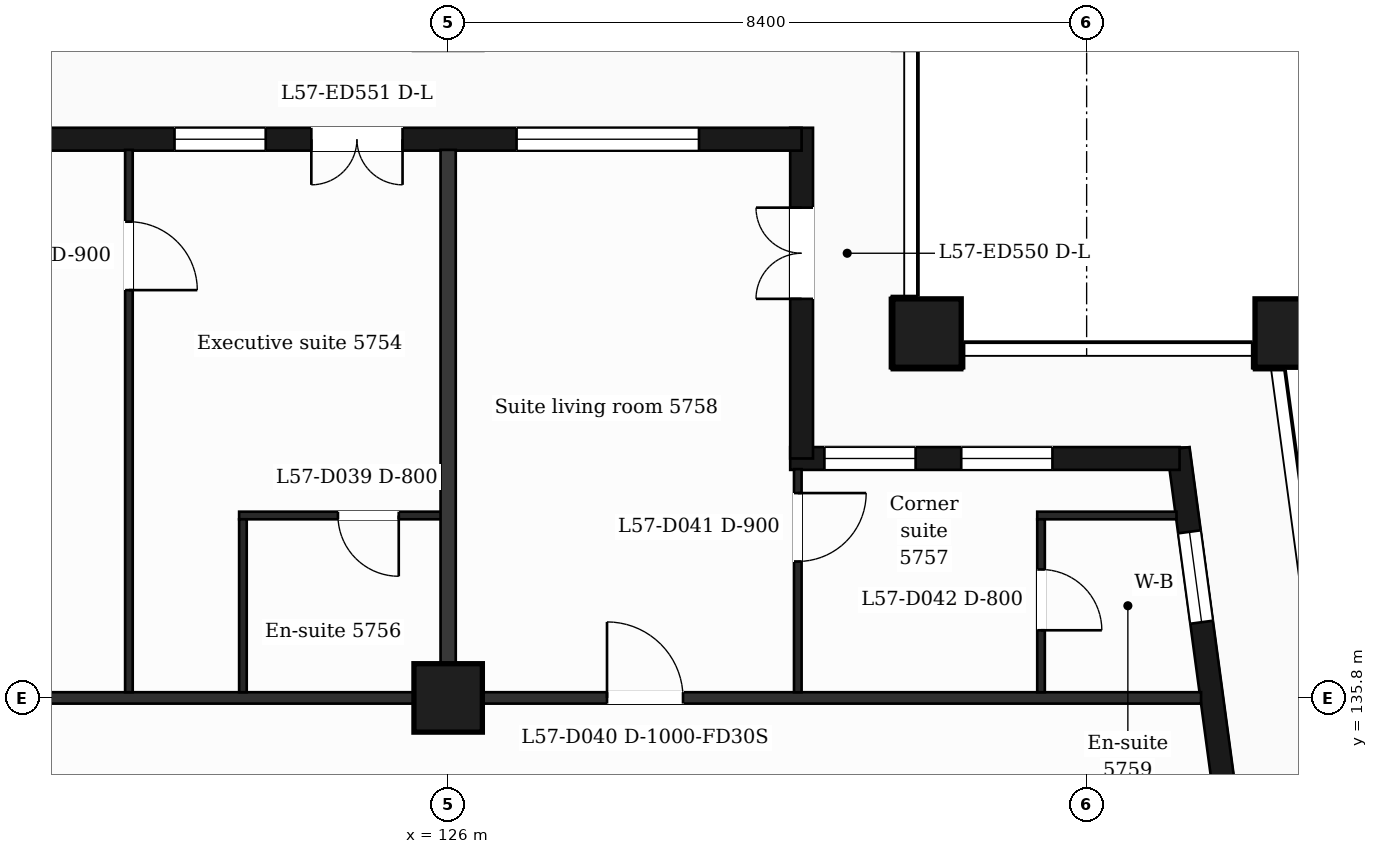
"""IFC4 building model, lengths in metres.
Left out: names, types, materials, properties, quantities, classifications, styles, units other than length and angle.
Written with IfcOpenShell. Run it as: python <this file> out.ifc"""

import sys

from ifc_helpers import new_model, si_unit, direction, frame, frame_2d, origin, origin_2d, place, context, subcontext, project, spatial, rectangle, extrude, element, fill, save


model = new_model("IFC4")
c1 = context("Model", 3, precision=1e-05, world=origin(), true_north=direction((0.0, 1.0)))
c2 = subcontext(c1, "Body", "Model", "MODEL_VIEW")
j1 = project(units=[si_unit("LENGTHUNIT", "METRE"), si_unit("PLANEANGLEUNIT", "RADIAN")], contexts=[c1])
p1 = place(None, origin())
s1 = spatial("IfcSite", under=j1, at=p1, CompositionType="ELEMENT")
p2 = place(p1, origin())
s2 = spatial("IfcBuilding", under=s1, at=p2, CompositionType="ELEMENT")
p3 = place(p2, frame((0.0, 0.0, 235.5)))
s3 = spatial("IfcBuildingStorey", under=s2, at=p3, CompositionType="ELEMENT", Elevation=235.5)
for number, where, z_axis, x_axis in (
    (1, (132.3, 140.6, 0.0), (0.0, 0.0, 1.0), (1.0, 0.0, 0.0)),
    (2, (137.065, 140.6, 0.0), (0.0, 0.0, 1.0), (1.0, 0.0, 0.0)),
    (3, (126.0, 135.8, 0.0), (0.0, 0.0, 1.0), (1.0, 0.0, 0.0)),
):
    element("IfcColumn", number, at=place(p3, frame(where, z_axis=z_axis, x_axis=x_axis)), inside=s3, PredefinedType="COLUMN", context=c2, shape_type="SweptSolid", body=[
        extrude(rectangle(XDim=0.9, YDim=0.9, at=origin_2d()), origin(), (0.0, 0.0, 1.0), 3.7),
    ])
p4 = place(p3, frame((136.504, 132.4, 0.0), z_axis=(0.0, 0.0, 1.0), x_axis=(-0.133399697462, 0.99106231929, 0.0)))
e4 = element("IfcWall", 4, at=p4, inside=s3, PredefinedType="SOLIDWALL", context=c2, shape_type="SweptSolid", body=[
    extrude(rectangle(XDim=6.74, YDim=0.3, at=frame_2d((3.37, 0.0))), origin(), (0.0, 0.0, 1.0), 3.38),
])
p5 = place(p4, frame((1.115, 0.0, 0.0)))
e5 = element("IfcOpeningElement", 5, at=p5, cuts=e4, PredefinedType="OPENING", context=c2, shape_type="SweptSolid", body=[
    extrude(rectangle(XDim=1.2, YDim=2.4, at=frame_2d((0.6, 1.2))), frame((0.0, 0.16, 0.0), z_axis=(0.0, -1.0, 0.0), x_axis=(1.0, 0.0, 0.0)), (0.0, 0.0, 1.0), 0.32),
])
p6 = place(p4, frame((4.436, 0.0, 0.9)))
e6 = element("IfcOpeningElement", 6, at=p6, cuts=e4, PredefinedType="OPENING", context=c2, shape_type="SweptSolid", body=[
    extrude(rectangle(XDim=1.2, YDim=2.1, at=frame_2d((0.6, 1.05))), frame((0.0, 0.16, 0.0), z_axis=(0.0, -1.0, 0.0), x_axis=(1.0, 0.0, 0.0)), (0.0, 0.0, 1.0), 0.32),
])
p7 = place(p3, frame((135.623, 138.95, 0.0), z_axis=(0.0, 0.0, 1.0), x_axis=(-1.0, 0.0, 0.0)))
e7 = element("IfcWall", 7, at=p7, inside=s3, PredefinedType="SOLIDWALL", context=c2, shape_type="SweptSolid", body=[
    extrude(rectangle(XDim=5.123, YDim=0.3, at=frame_2d((2.561, 0.0))), origin(), (0.0, 0.0, 1.0), 3.38),
])
p8 = place(p7, frame((1.673, 0.0, 0.9)))
e8 = element("IfcOpeningElement", 8, at=p8, cuts=e7, PredefinedType="OPENING", context=c2, shape_type="SweptSolid", body=[
    extrude(rectangle(XDim=1.2, YDim=2.1, at=frame_2d((0.6, 1.05))), frame((0.0, 0.16, 0.0), z_axis=(0.0, -1.0, 0.0), x_axis=(1.0, 0.0, 0.0)), (0.0, 0.0, 1.0), 0.32),
])
p9 = place(p7, frame((3.473, 0.0, 0.9)))
e9 = element("IfcOpeningElement", 9, at=p9, cuts=e7, PredefinedType="OPENING", context=c2, shape_type="SweptSolid", body=[
    extrude(rectangle(XDim=1.2, YDim=2.1, at=frame_2d((0.6, 1.05))), frame((0.0, 0.16, 0.0), z_axis=(0.0, -1.0, 0.0), x_axis=(1.0, 0.0, 0.0)), (0.0, 0.0, 1.0), 0.32),
])
p10 = place(p3, frame((130.65, 138.95, 0.0), z_axis=(0.0, 0.0, 1.0), x_axis=(0.0, 1.0, 0.0)))
e10 = element("IfcWall", 10, at=p10, inside=s3, PredefinedType="SOLIDWALL", context=c2, shape_type="SweptSolid", body=[
    extrude(rectangle(XDim=4.35, YDim=0.3, at=frame_2d((2.175, 0.0))), origin(), (0.0, 0.0, 1.0), 3.38),
])
p11 = place(p10, frame((2.1, 0.0, 0.0)))
e11 = element("IfcOpeningElement", 11, at=p11, cuts=e10, PredefinedType="OPENING", context=c2, shape_type="SweptSolid", body=[
    extrude(rectangle(XDim=1.2, YDim=2.4, at=frame_2d((0.6, 1.2))), frame((0.0, 0.16, 0.0), z_axis=(0.0, -1.0, 0.0), x_axis=(1.0, 0.0, 0.0)), (0.0, 0.0, 1.0), 0.32),
])
p12 = place(p3, frame((130.65, 143.15, 0.0), z_axis=(0.0, 0.0, 1.0), x_axis=(-1.0, 0.0, 0.0)))
e12 = element("IfcWall", 12, at=p12, inside=s3, PredefinedType="SOLIDWALL", context=c2, shape_type="SweptSolid", body=[
    extrude(rectangle(XDim=14.25, YDim=0.3, at=frame_2d((7.125, 0.0))), origin(), (0.0, 0.0, 1.0), 3.38),
])
p13 = place(p12, frame((1.35, 0.0, 0.9)))
e13 = element("IfcOpeningElement", 13, at=p13, cuts=e12, PredefinedType="OPENING", context=c2, shape_type="SweptSolid", body=[
    extrude(rectangle(XDim=2.4, YDim=2.1, at=frame_2d((1.2, 1.05))), frame((0.0, 0.16, 0.0), z_axis=(0.0, -1.0, 0.0), x_axis=(1.0, 0.0, 0.0)), (0.0, 0.0, 1.0), 0.32),
])
p14 = place(p12, frame((5.25, 0.0, 0.0)))
e14 = element("IfcOpeningElement", 14, at=p14, cuts=e12, PredefinedType="OPENING", context=c2, shape_type="SweptSolid", body=[
    extrude(rectangle(XDim=1.2, YDim=2.4, at=frame_2d((0.6, 1.2))), frame((0.0, 0.16, 0.0), z_axis=(0.0, -1.0, 0.0), x_axis=(1.0, 0.0, 0.0)), (0.0, 0.0, 1.0), 0.32),
])
p15 = place(p12, frame((7.05, 0.0, 0.9)))
e15 = element("IfcOpeningElement", 15, at=p15, cuts=e12, PredefinedType="OPENING", context=c2, shape_type="SweptSolid", body=[
    extrude(rectangle(XDim=1.2, YDim=2.1, at=frame_2d((0.6, 1.05))), frame((0.0, 0.16, 0.0), z_axis=(0.0, -1.0, 0.0), x_axis=(1.0, 0.0, 0.0)), (0.0, 0.0, 1.0), 0.32),
])
p16 = place(p12, frame((10.35, 0.0, 0.9)))
e16 = element("IfcOpeningElement", 16, at=p16, cuts=e12, PredefinedType="OPENING", context=c2, shape_type="SweptSolid", body=[
    extrude(rectangle(XDim=1.2, YDim=2.1, at=frame_2d((0.6, 1.05))), frame((0.0, 0.16, 0.0), z_axis=(0.0, -1.0, 0.0), x_axis=(1.0, 0.0, 0.0)), (0.0, 0.0, 1.0), 0.32),
])
p17 = place(p3, frame((90.895, 135.8, 0.0), z_axis=(0.0, 0.0, 1.0), x_axis=(1.0, 0.0, 0.0)))
e17 = element("IfcWall", 17, at=p17, inside=s3, PredefinedType="PARTITIONING", context=c2, shape_type="SweptSolid", body=[
    extrude(rectangle(XDim=45.011, YDim=0.15, at=frame_2d((22.505, 0.0))), origin(), (0.0, 0.0, 1.0), 3.38),
])
p18 = place(p17, frame((7.675, 0.0, 0.0)))
e18 = element("IfcOpeningElement", 18, at=p18, cuts=e17, PredefinedType="OPENING", context=c2, shape_type="SweptSolid", body=[
    extrude(rectangle(XDim=1.0, YDim=2.1, at=frame_2d((0.5, 1.05))), frame((0.0, 0.085, 0.0), z_axis=(0.0, -1.0, 0.0), x_axis=(1.0, 0.0, 0.0)), (0.0, 0.0, 1.0), 0.17),
])
p19 = place(p17, frame((12.58, 0.0, 0.0)))
e19 = element("IfcOpeningElement", 19, at=p19, cuts=e17, PredefinedType="OPENING", context=c2, shape_type="SweptSolid", body=[
    extrude(rectangle(XDim=0.95, YDim=2.1, at=frame_2d((0.475, 1.05))), frame((0.0, 0.085, 0.0), z_axis=(0.0, -1.0, 0.0), x_axis=(1.0, 0.0, 0.0)), (0.0, 0.0, 1.0), 0.17),
])
p20 = place(p17, frame((20.568, 0.0, 0.0)))
e20 = element("IfcOpeningElement", 20, at=p20, cuts=e17, PredefinedType="OPENING", context=c2, shape_type="SweptSolid", body=[
    extrude(rectangle(XDim=0.95, YDim=2.1, at=frame_2d((0.475, 1.05))), frame((0.0, 0.085, 0.0), z_axis=(0.0, -1.0, 0.0), x_axis=(1.0, 0.0, 0.0)), (0.0, 0.0, 1.0), 0.17),
])
p21 = place(p17, frame((24.865, 0.0, 0.0)))
e21 = element("IfcOpeningElement", 21, at=p21, cuts=e17, PredefinedType="OPENING", context=c2, shape_type="SweptSolid", body=[
    extrude(rectangle(XDim=1.0, YDim=2.1, at=frame_2d((0.5, 1.05))), frame((0.0, 0.085, 0.0), z_axis=(0.0, -1.0, 0.0), x_axis=(1.0, 0.0, 0.0)), (0.0, 0.0, 1.0), 0.17),
])
p22 = place(p17, frame((37.195, 0.0, 0.0)))
e22 = element("IfcOpeningElement", 22, at=p22, cuts=e17, PredefinedType="OPENING", context=c2, shape_type="SweptSolid", body=[
    extrude(rectangle(XDim=1.0, YDim=2.1, at=frame_2d((0.5, 1.05))), frame((0.0, 0.085, 0.0), z_axis=(0.0, -1.0, 0.0), x_axis=(1.0, 0.0, 0.0)), (0.0, 0.0, 1.0), 0.17),
])
p23 = place(p3, frame((123.25, 138.2, 0.0), z_axis=(0.0, 0.0, 1.0), x_axis=(1.0, 0.0, 0.0)))
e23 = element("IfcWall", 23, at=p23, inside=s3, PredefinedType="PARTITIONING", context=c2, shape_type="SweptSolid", body=[
    extrude(rectangle(XDim=2.75, YDim=0.1, at=frame_2d((1.375, 0.0))), origin(), (0.0, 0.0, 1.0), 3.38),
])
p24 = place(p23, frame((1.3, 0.0, 0.0)))
e24 = element("IfcOpeningElement", 24, at=p24, cuts=e23, PredefinedType="OPENING", context=c2, shape_type="SweptSolid", body=[
    extrude(rectangle(XDim=0.8, YDim=2.1, at=frame_2d((0.4, 1.05))), frame((0.0, 0.06, 0.0), z_axis=(0.0, -1.0, 0.0), x_axis=(1.0, 0.0, 0.0)), (0.0, 0.0, 1.0), 0.12),
])
p25 = place(p3, frame((133.75, 138.2, 0.0), z_axis=(0.0, 0.0, 1.0), x_axis=(1.0, 0.0, 0.0)))
e25 = element("IfcWall", 25, at=p25, inside=s3, PredefinedType="PARTITIONING", context=c2, shape_type="SweptSolid", body=[
    extrude(rectangle(XDim=1.832, YDim=0.1, at=frame_2d((0.916, 0.0))), origin(), (0.0, 0.0, 1.0), 3.38),
])
p26 = place(p3, frame((121.8, 135.875, 0.0), z_axis=(0.0, 0.0, 1.0), x_axis=(0.0, 1.0, 0.0)))
e26 = element("IfcWall", 26, at=p26, inside=s3, PredefinedType="PARTITIONING", context=c2, shape_type="SweptSolid", body=[
    extrude(rectangle(XDim=7.135, YDim=0.1, at=frame_2d((3.567, 0.0))), origin(), (0.0, 0.0, 1.0), 3.38),
])
p27 = place(p26, frame((5.29, 0.0, 0.0)))
e27 = element("IfcOpeningElement", 27, at=p27, cuts=e26, PredefinedType="OPENING", context=c2, shape_type="SweptSolid", body=[
    extrude(rectangle(XDim=0.9, YDim=2.1, at=frame_2d((0.45, 1.05))), frame((0.0, 0.06, 0.0), z_axis=(0.0, -1.0, 0.0), x_axis=(1.0, 0.0, 0.0)), (0.0, 0.0, 1.0), 0.12),
])
p28 = place(p3, frame((123.3, 135.875, 0.0), z_axis=(0.0, 0.0, 1.0), x_axis=(0.0, 1.0, 0.0)))
e28 = element("IfcWall", 28, at=p28, inside=s3, PredefinedType="PARTITIONING", context=c2, shape_type="SweptSolid", body=[
    extrude(rectangle(XDim=2.275, YDim=0.1, at=frame_2d((1.137, 0.0))), origin(), (0.0, 0.0, 1.0), 3.38),
])
p29 = place(p3, frame((126.0, 135.875, 0.0), z_axis=(0.0, 0.0, 1.0), x_axis=(0.0, 1.0, 0.0)))
e29 = element("IfcWall", 29, at=p29, inside=s3, PredefinedType="PARTITIONING", context=c2, shape_type="SweptSolid", body=[
    extrude(rectangle(XDim=7.135, YDim=0.2, at=frame_2d((3.567, 0.0))), origin(), (0.0, 0.0, 1.0), 3.38),
])
p30 = place(p3, frame((130.6, 135.875, 0.0), z_axis=(0.0, 0.0, 1.0), x_axis=(0.0, 1.0, 0.0)))
e30 = element("IfcWall", 30, at=p30, inside=s3, PredefinedType="PARTITIONING", context=c2, shape_type="SweptSolid", body=[
    extrude(rectangle(XDim=2.935, YDim=0.1, at=frame_2d((1.468, 0.0))), origin(), (0.0, 0.0, 1.0), 3.38),
])
p31 = place(p30, frame((1.72, 0.0, 0.0)))
e31 = element("IfcOpeningElement", 31, at=p31, cuts=e30, PredefinedType="OPENING", context=c2, shape_type="SweptSolid", body=[
    extrude(rectangle(XDim=0.9, YDim=2.1, at=frame_2d((0.45, 1.05))), frame((0.0, 0.06, 0.0), z_axis=(0.0, -1.0, 0.0), x_axis=(1.0, 0.0, 0.0)), (0.0, 0.0, 1.0), 0.12),
])
p32 = place(p3, frame((133.8, 135.875, 0.0), z_axis=(0.0, 0.0, 1.0), x_axis=(0.0, 1.0, 0.0)))
e32 = element("IfcWall", 32, at=p32, inside=s3, PredefinedType="PARTITIONING", context=c2, shape_type="SweptSolid", body=[
    extrude(rectangle(XDim=2.275, YDim=0.1, at=frame_2d((1.137, 0.0))), origin(), (0.0, 0.0, 1.0), 3.38),
])
p33 = place(p32, frame((0.815, 0.0, 0.0)))
e33 = element("IfcOpeningElement", 33, at=p33, cuts=e32, PredefinedType="OPENING", context=c2, shape_type="SweptSolid", body=[
    extrude(rectangle(XDim=0.8, YDim=2.1, at=frame_2d((0.4, 1.05))), frame((0.0, 0.06, 0.0), z_axis=(0.0, -1.0, 0.0), x_axis=(1.0, 0.0, 0.0)), (0.0, 0.0, 1.0), 0.12),
])
p34 = place(p6, origin())
e34 = element("IfcWindow", 34, at=p34, inside=s3, PartitioningType="SINGLE_PANEL", PredefinedType="WINDOW", context=c2, shape_type="SweptSolid", body=[
    extrude(rectangle(XDim=1.2, YDim=2.1, at=frame_2d((0.6, 1.05))), frame((0.0, 0.03, 0.0), z_axis=(0.0, -1.0, 0.0), x_axis=(1.0, 0.0, 0.0)), (0.0, 0.0, 1.0), 0.06),
])
fill(e6, e34)
p35 = place(p8, origin())
e35 = element("IfcWindow", 35, at=p35, inside=s3, PartitioningType="SINGLE_PANEL", PredefinedType="WINDOW", context=c2, shape_type="SweptSolid", body=[
    extrude(rectangle(XDim=1.2, YDim=2.1, at=frame_2d((0.6, 1.05))), frame((0.0, 0.03, 0.0), z_axis=(0.0, -1.0, 0.0), x_axis=(1.0, 0.0, 0.0)), (0.0, 0.0, 1.0), 0.06),
])
fill(e8, e35)
p36 = place(p9, origin())
e36 = element("IfcWindow", 36, at=p36, inside=s3, PartitioningType="SINGLE_PANEL", PredefinedType="WINDOW", context=c2, shape_type="SweptSolid", body=[
    extrude(rectangle(XDim=1.2, YDim=2.1, at=frame_2d((0.6, 1.05))), frame((0.0, 0.03, 0.0), z_axis=(0.0, -1.0, 0.0), x_axis=(1.0, 0.0, 0.0)), (0.0, 0.0, 1.0), 0.06),
])
fill(e9, e36)
p37 = place(p11, origin())
e37 = element("IfcDoor", 37, at=p37, inside=s3, OperationType="DOUBLE_DOOR_SINGLE_SWING", PredefinedType="DOOR", context=c2, shape_type="SweptSolid", body=[
    extrude(rectangle(XDim=1.2, YDim=2.4, at=frame_2d((0.6, 1.2))), frame((0.0, 0.025, 0.0), z_axis=(0.0, -1.0, 0.0), x_axis=(1.0, 0.0, 0.0)), (0.0, 0.0, 1.0), 0.05),
])
fill(e11, e37)
p38 = place(p13, origin())
e38 = element("IfcWindow", 38, at=p38, inside=s3, PartitioningType="SINGLE_PANEL", PredefinedType="WINDOW", context=c2, shape_type="SweptSolid", body=[
    extrude(rectangle(XDim=2.4, YDim=2.1, at=frame_2d((1.2, 1.05))), frame((0.0, 0.03, 0.0), z_axis=(0.0, -1.0, 0.0), x_axis=(1.0, 0.0, 0.0)), (0.0, 0.0, 1.0), 0.06),
])
fill(e13, e38)
p39 = place(p14, origin())
e39 = element("IfcDoor", 39, at=p39, inside=s3, OperationType="DOUBLE_DOOR_SINGLE_SWING", PredefinedType="DOOR", context=c2, shape_type="SweptSolid", body=[
    extrude(rectangle(XDim=1.2, YDim=2.4, at=frame_2d((0.6, 1.2))), frame((0.0, 0.025, 0.0), z_axis=(0.0, -1.0, 0.0), x_axis=(1.0, 0.0, 0.0)), (0.0, 0.0, 1.0), 0.05),
])
fill(e14, e39)
p40 = place(p15, origin())
e40 = element("IfcWindow", 40, at=p40, inside=s3, PartitioningType="SINGLE_PANEL", PredefinedType="WINDOW", context=c2, shape_type="SweptSolid", body=[
    extrude(rectangle(XDim=1.2, YDim=2.1, at=frame_2d((0.6, 1.05))), frame((0.0, 0.03, 0.0), z_axis=(0.0, -1.0, 0.0), x_axis=(1.0, 0.0, 0.0)), (0.0, 0.0, 1.0), 0.06),
])
fill(e15, e40)
p41 = place(p27, origin())
e41 = element("IfcDoor", 41, at=p41, inside=s3, OperationType="SINGLE_SWING_LEFT", PredefinedType="DOOR", context=c2, shape_type="SweptSolid", body=[
    extrude(rectangle(XDim=0.9, YDim=2.1, at=frame_2d((0.45, 1.05))), frame((0.0, 0.025, 0.0), z_axis=(0.0, -1.0, 0.0), x_axis=(1.0, 0.0, 0.0)), (0.0, 0.0, 1.0), 0.05),
])
fill(e27, e41)
p42 = place(p24, origin())
e42 = element("IfcDoor", 42, at=p42, inside=s3, OperationType="SINGLE_SWING_RIGHT", PredefinedType="DOOR", context=c2, shape_type="SweptSolid", body=[
    extrude(rectangle(XDim=0.8, YDim=2.1, at=frame_2d((0.4, 1.05))), frame((0.0, 0.025, 0.0), z_axis=(0.0, -1.0, 0.0), x_axis=(1.0, 0.0, 0.0)), (0.0, 0.0, 1.0), 0.05),
])
fill(e24, e42)
p43 = place(p22, origin())
e43 = element("IfcDoor", 43, at=p43, inside=s3, OperationType="SINGLE_SWING_LEFT", PredefinedType="DOOR", context=c2, shape_type="SweptSolid", body=[
    extrude(rectangle(XDim=1.0, YDim=2.1, at=frame_2d((0.5, 1.05))), frame((0.0, 0.025, 0.0), z_axis=(0.0, -1.0, 0.0), x_axis=(1.0, 0.0, 0.0)), (0.0, 0.0, 1.0), 0.05),
])
fill(e22, e43)
p44 = place(p31, origin())
e44 = element("IfcDoor", 44, at=p44, inside=s3, OperationType="SINGLE_SWING_RIGHT", PredefinedType="DOOR", context=c2, shape_type="SweptSolid", body=[
    extrude(rectangle(XDim=0.9, YDim=2.1, at=frame_2d((0.45, 1.05))), frame((0.0, 0.025, 0.0), z_axis=(0.0, -1.0, 0.0), x_axis=(1.0, 0.0, 0.0)), (0.0, 0.0, 1.0), 0.05),
])
fill(e31, e44)
p45 = place(p33, origin())
e45 = element("IfcDoor", 45, at=p45, inside=s3, OperationType="SINGLE_SWING_LEFT", PredefinedType="DOOR", context=c2, shape_type="SweptSolid", body=[
    extrude(rectangle(XDim=0.8, YDim=2.1, at=frame_2d((0.4, 1.05))), frame((0.0, 0.025, 0.0), z_axis=(0.0, -1.0, 0.0), x_axis=(1.0, 0.0, 0.0)), (0.0, 0.0, 1.0), 0.05),
])
fill(e33, e45)
save(model, sys.argv[1])
